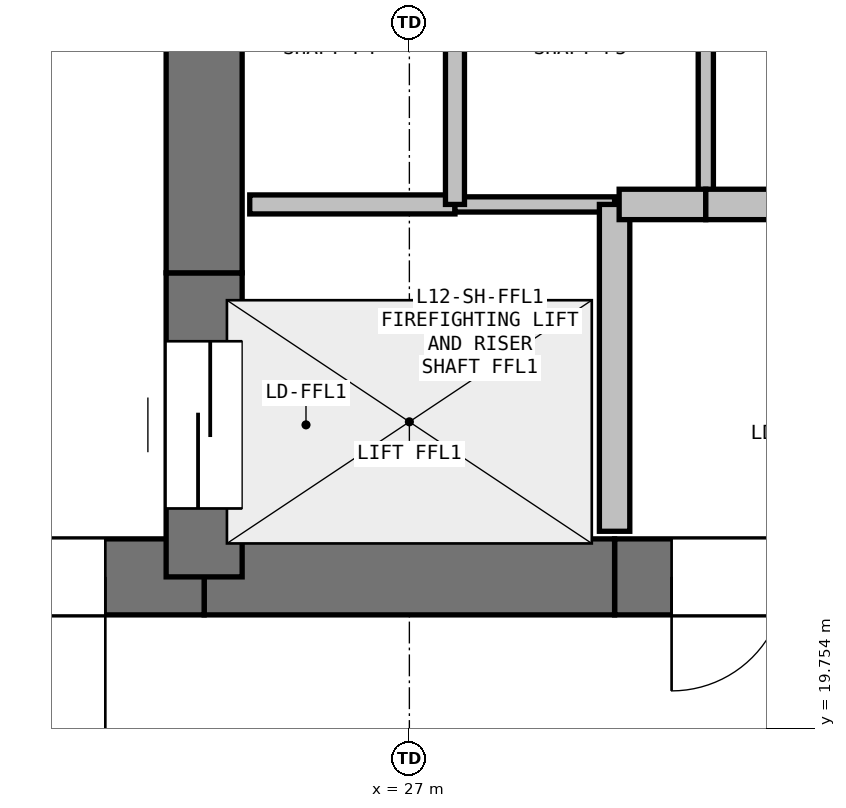
"""IFC4 building model, lengths in metres.
Left out: names, types, materials, properties, quantities, classifications, styles, units other than length and angle.
Written with IfcOpenShell. Run it as: python <this file> out.ifc"""

import sys

from ifc_helpers import new_model, si_unit, direction, frame, frame_2d, origin, place, context, subcontext, project, spatial, rectangle, extrude, element, fill, save


model = new_model("IFC4")
c1 = context("Model", 3, precision=1e-05, world=origin(), true_north=direction((0.0, 1.0)))
c2 = subcontext(c1, "Body", "Model", "MODEL_VIEW")
j1 = project(units=[si_unit("LENGTHUNIT", "METRE"), si_unit("PLANEANGLEUNIT", "RADIAN")], contexts=[c1])
p1 = place(None, origin())
s1 = spatial("IfcSite", under=j1, at=p1, CompositionType="ELEMENT")
p2 = place(p1, origin())
s2 = spatial("IfcBuilding", under=s1, at=p2, CompositionType="ELEMENT")
p3 = place(p2, frame((0.0, 0.0, 45.6)))
s3 = spatial("IfcBuildingStorey", under=s2, at=p3, CompositionType="ELEMENT", Elevation=45.6)
p4 = place(p3, frame((30.6, 20.75, 0.0), z_axis=(0.0, 0.0, 1.0), x_axis=(-1.0, 0.0, 0.0)))
e1 = element("IfcWall", 1, at=p4, inside=s3, PredefinedType="SHEAR", context=c2, shape_type="SweptSolid", body=[
    extrude(rectangle(XDim=2.25, YDim=0.5, at=frame_2d((1.125, 0.0))), origin(), (0.0, 0.0, 1.0), 3.04),
])
p5 = place(p4, frame((0.375, 0.0, 0.0)))
e2 = element("IfcOpeningElement", 2, at=p5, cuts=e1, PredefinedType="OPENING", context=c2, shape_type="SweptSolid", body=[
    extrude(rectangle(XDim=1.5, YDim=2.2, at=frame_2d((0.75, 1.1))), frame((0.0, 0.26, 0.0), z_axis=(0.0, -1.0, 0.0), x_axis=(1.0, 0.0, 0.0)), (0.0, 0.0, 1.0), 0.52),
])
p6 = place(p3, frame((28.35, 20.75, 0.0), z_axis=(0.0, 0.0, 1.0), x_axis=(-1.0, 0.0, 0.0)))
e3 = element("IfcWall", 3, at=p6, inside=s3, PredefinedType="SHEAR", context=c2, shape_type="SweptSolid", body=[
    extrude(rectangle(XDim=2.7, YDim=0.5, at=frame_2d((1.35, 0.0))), origin(), (0.0, 0.0, 1.0), 3.04),
])
p7 = place(p3, frame((25.65, 20.75, 0.0), z_axis=(0.0, 0.0, 1.0), x_axis=(-1.0, 0.0, 0.0)))
e4 = element("IfcWall", 4, at=p7, inside=s3, PredefinedType="SHEAR", context=c2, shape_type="SweptSolid", body=[
    extrude(rectangle(XDim=3.45, YDim=0.5, at=frame_2d((1.725, 0.0))), origin(), (0.0, 0.0, 1.0), 3.04),
])
p8 = place(p7, frame((0.65, 0.0, 0.0)))
e5 = element("IfcOpeningElement", 5, at=p8, cuts=e4, PredefinedType="OPENING", context=c2, shape_type="SweptSolid", body=[
    extrude(rectangle(XDim=1.15, YDim=2.15, at=frame_2d((0.575, 1.075))), frame((0.0, 0.26, 0.0), z_axis=(0.0, -1.0, 0.0), x_axis=(1.0, 0.0, 0.0)), (0.0, 0.0, 1.0), 0.52),
])
p9 = place(p3, frame((25.65, 20.75, 0.0), z_axis=(0.0, 0.0, 1.0), x_axis=(0.0, 1.0, 0.0)))
e6 = element("IfcWall", 6, at=p9, inside=s3, PredefinedType="SHEAR", context=c2, shape_type="SweptSolid", body=[
    extrude(rectangle(XDim=2.0, YDim=0.5, at=frame_2d((1.0, 0.0))), origin(), (0.0, 0.0, 1.0), 3.04),
])
p10 = place(p9, frame((0.45, 0.0, 0.0)))
e7 = element("IfcOpeningElement", 7, at=p10, cuts=e6, PredefinedType="OPENING", context=c2, shape_type="SweptSolid", body=[
    extrude(rectangle(XDim=1.1, YDim=2.15, at=frame_2d((0.55, 1.075))), frame((0.0, 0.26, 0.0), z_axis=(0.0, -1.0, 0.0), x_axis=(1.0, 0.0, 0.0)), (0.0, 0.0, 1.0), 0.52),
])
p11 = place(p3, frame((25.65, 22.75, 0.0), z_axis=(0.0, 0.0, 1.0), x_axis=(0.0, 1.0, 0.0)))
e8 = element("IfcWall", 8, at=p11, inside=s3, PredefinedType="SHEAR", context=c2, shape_type="SweptSolid", body=[
    extrude(rectangle(XDim=2.8, YDim=0.5, at=frame_2d((1.4, 0.0))), origin(), (0.0, 0.0, 1.0), 3.04),
])
p12 = place(p3, frame((25.95, 23.2, 0.0), z_axis=(0.0, 0.0, 1.0), x_axis=(1.0, 0.0, 0.0)))
e9 = element("IfcWall", 9, at=p12, inside=s3, PredefinedType="PARTITIONING", context=c2, shape_type="SweptSolid", body=[
    extrude(rectangle(XDim=1.35, YDim=0.125, at=frame_2d((0.675, 0.0))), origin(), (0.0, 0.0, 1.0), 3.04),
])
p13 = place(p3, frame((27.3, 23.2, 0.0), z_axis=(0.0, 0.0, 1.0), x_axis=(1.0, 0.0, 0.0)))
e10 = element("IfcWall", 10, at=p13, inside=s3, PredefinedType="PARTITIONING", context=c2, shape_type="SweptSolid", body=[
    extrude(rectangle(XDim=1.05, YDim=0.1, at=frame_2d((0.525, 0.0))), origin(), (0.0, 0.0, 1.0), 3.04),
])
p14 = place(p3, frame((28.35, 23.2, 0.0), z_axis=(0.0, 0.0, 1.0), x_axis=(0.0, -1.0, 0.0)))
e11 = element("IfcWall", 11, at=p14, inside=s3, PredefinedType="PARTITIONING", context=c2, shape_type="SweptSolid", body=[
    extrude(rectangle(XDim=2.15, YDim=0.2, at=frame_2d((1.075, 0.0))), origin(), (0.0, 0.0, 1.0), 3.04),
])
p15 = place(p3, frame((27.3, 25.4, 0.0), z_axis=(0.0, 0.0, 1.0), x_axis=(0.0, -1.0, 0.0)))
e12 = element("IfcWall", 12, at=p15, inside=s3, PredefinedType="PARTITIONING", context=c2, shape_type="SweptSolid", body=[
    extrude(rectangle(XDim=2.2, YDim=0.125, at=frame_2d((1.1, 0.0))), origin(), (0.0, 0.0, 1.0), 3.04),
])
p16 = place(p3, frame((28.95, 25.4, 0.0), z_axis=(0.0, 0.0, 1.0), x_axis=(0.0, -1.0, 0.0)))
e13 = element("IfcWall", 13, at=p16, inside=s3, PredefinedType="PARTITIONING", context=c2, shape_type="SweptSolid", body=[
    extrude(rectangle(XDim=2.2, YDim=0.1, at=frame_2d((1.1, 0.0))), origin(), (0.0, 0.0, 1.0), 3.04),
])
p17 = place(p3, frame((28.95, 23.2, 0.0), z_axis=(0.0, 0.0, 1.0), x_axis=(-1.0, 0.0, 0.0)))
e14 = element("IfcWall", 14, at=p17, inside=s3, PredefinedType="PARTITIONING", context=c2, shape_type="SweptSolid", body=[
    extrude(rectangle(XDim=0.57, YDim=0.2, at=frame_2d((0.285, 0.0))), origin(), (0.0, 0.0, 1.0), 3.04),
])
p18 = place(p3, frame((30.6, 23.2, 0.0), z_axis=(0.0, 0.0, 1.0), x_axis=(-1.0, 0.0, 0.0)))
e15 = element("IfcWall", 15, at=p18, inside=s3, PredefinedType="PARTITIONING", context=c2, shape_type="SweptSolid", body=[
    extrude(rectangle(XDim=1.65, YDim=0.2, at=frame_2d((0.825, 0.0))), origin(), (0.0, 0.0, 1.0), 3.04),
])
p19 = place(p10, origin())
e16 = element("IfcDoor", 16, at=p19, inside=s3, OperationType="SLIDING_TO_LEFT", PredefinedType="DOOR", context=c2, shape_type="SweptSolid", body=[
    extrude(rectangle(XDim=1.1, YDim=2.15, at=frame_2d((0.55, 1.075))), frame((0.0, 0.025, 0.0), z_axis=(0.0, -1.0, 0.0), x_axis=(1.0, 0.0, 0.0)), (0.0, 0.0, 1.0), 0.05),
])
fill(e7, e16)
p20 = place(p8, origin())
e17 = element("IfcDoor", 17, at=p20, inside=s3, OperationType="SINGLE_SWING_LEFT", PredefinedType="DOOR", context=c2, shape_type="SweptSolid", body=[
    extrude(rectangle(XDim=1.15, YDim=2.15, at=frame_2d((0.575, 1.075))), frame((0.0, 0.025, 0.0), z_axis=(0.0, -1.0, 0.0), x_axis=(1.0, 0.0, 0.0)), (0.0, 0.0, 1.0), 0.05),
])
fill(e5, e17)
p21 = place(p5, origin())
e18 = element("IfcDoor", 18, at=p21, inside=s3, OperationType="DOUBLE_DOOR_SINGLE_SWING", PredefinedType="DOOR", context=c2, shape_type="SweptSolid", body=[
    extrude(rectangle(XDim=1.5, YDim=2.2, at=frame_2d((0.75, 1.1))), frame((0.0, 0.025, 0.0), z_axis=(0.0, -1.0, 0.0), x_axis=(1.0, 0.0, 0.0)), (0.0, 0.0, 1.0), 0.05),
])
fill(e2, e18)
save(model, sys.argv[1])
